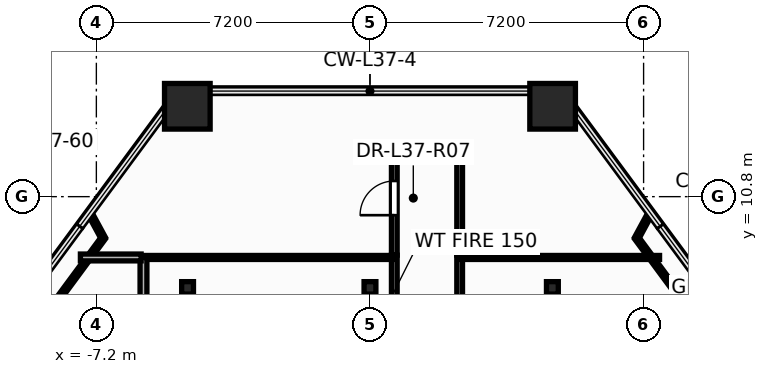
"""IFC4 building model, lengths in metres.
Left out: names, types, materials, properties, quantities, classifications, styles, units other than length and angle.
Written with IfcOpenShell. Run it as: python <this file> out.ifc"""

import sys

from ifc_helpers import new_model, si_unit, direction, frame, frame_2d, origin, origin_2d, place, context, subcontext, project, spatial, rectangle, hollow_rectangle, i_section, extrude, element, fill, save


model = new_model("IFC4")
c1 = context("Model", 3, precision=1e-05, world=origin(), true_north=direction((0.0, 1.0)))
c2 = subcontext(c1, "Body", "Model", "MODEL_VIEW")
j1 = project(units=[si_unit("LENGTHUNIT", "METRE"), si_unit("PLANEANGLEUNIT", "RADIAN")], contexts=[c1])
p1 = place(None, origin())
s1 = spatial("IfcSite", under=j1, at=p1, CompositionType="ELEMENT")
p2 = place(p1, origin())
s2 = spatial("IfcBuilding", under=s1, at=p2, CompositionType="ELEMENT")
p3 = place(p2, frame((0.0, 0.0, 143.7)))
s3 = spatial("IfcBuildingStorey", under=s2, at=p3, CompositionType="ELEMENT", Elevation=143.7)
for number, where, z_axis, x_axis in (
    (1, (4.806, 13.178, 0.0), (0.0, 0.0, 1.0), (1.0, 0.0, 0.0)),
    (2, (-4.806, 13.178, 0.0), (0.0, 0.0, 1.0), (1.0, 0.0, 0.0)),
):
    element("IfcColumn", number, at=place(p3, frame(where, z_axis=z_axis, x_axis=x_axis)), inside=s3, PredefinedType="COLUMN", context=c2, shape_type="SweptSolid", body=[
        extrude(hollow_rectangle(XDim=1.2, YDim=1.2, WallThickness=0.055, at=origin_2d()), origin(), (0.0, 0.0, 1.0), 3.6),
    ])
for number, where, z_axis, x_axis in (
    (3, (-4.8, 8.4, 0.0), (0.0, 0.0, 1.0), (1.0, 0.0, 0.0)),
    (4, (0.0, 8.4, 0.0), (0.0, 0.0, 1.0), (1.0, 0.0, 0.0)),
    (5, (4.8, 8.4, 0.0), (0.0, 0.0, 1.0), (1.0, 0.0, 0.0)),
):
    element("IfcColumn", number, at=place(p3, frame(where, z_axis=z_axis, x_axis=x_axis)), inside=s3, PredefinedType="COLUMN", context=c2, shape_type="SweptSolid", body=[
        extrude(i_section(OverallWidth=0.311, OverallDepth=0.327, WebThickness=0.016, FlangeThickness=0.025, at=origin_2d()), origin(), (0.0, 0.0, 1.0), 3.6),
    ])
p4 = place(p3, frame((0.64, -2.76, 0.0), z_axis=(0.0, 0.0, 1.0), x_axis=(0.0, 1.0, 0.0)))
e6 = element("IfcWall", 6, at=p4, inside=s3, PredefinedType="PARTITIONING", context=c2, shape_type="SweptSolid", body=[
    extrude(rectangle(XDim=12.02, YDim=0.15, at=frame_2d((6.01, 0.0))), origin(), (0.0, 0.0, 1.0), 2.325),
])
p5 = place(p4, frame((0.519, 0.0, 0.0)))
e7 = element("IfcOpeningElement", 7, at=p5, cuts=e6, PredefinedType="OPENING", context=c2, shape_type="SweptSolid", body=[
    extrude(rectangle(XDim=0.906, YDim=2.104, at=frame_2d((0.45, 1.052))), frame((0.0, 0.085, 0.0), z_axis=(0.0, -1.0, 0.0), x_axis=(1.0, 0.0, 0.0)), (0.0, 0.0, 1.0), 0.17),
])
p6 = place(p3, frame((2.36, -2.76, 0.0), z_axis=(0.0, 0.0, 1.0), x_axis=(0.0, 1.0, 0.0)))
e8 = element("IfcWall", 8, at=p6, inside=s3, PredefinedType="PARTITIONING", context=c2, shape_type="SweptSolid", body=[
    extrude(rectangle(XDim=12.02, YDim=0.15, at=frame_2d((6.01, 0.0))), origin(), (0.0, 0.0, 1.0), 2.325),
])
p7 = place(p6, frame((0.359, 0.0, 0.0)))
e9 = element("IfcOpeningElement", 9, at=p7, cuts=e8, PredefinedType="OPENING", context=c2, shape_type="SweptSolid", body=[
    extrude(rectangle(XDim=0.906, YDim=2.104, at=frame_2d((0.45, 1.052))), frame((0.0, 0.085, 0.0), z_axis=(0.0, -1.0, 0.0), x_axis=(1.0, 0.0, 0.0)), (0.0, 0.0, 1.0), 0.17),
])
p8 = place(p3, frame((-6.02, 9.2, 0.0), z_axis=(0.0, 0.0, 1.0), x_axis=(1.0, 0.0, 0.0)))
e10 = element("IfcWall", 10, at=p8, inside=s3, PredefinedType="PARTITIONING", context=c2, shape_type="SweptSolid", body=[
    extrude(rectangle(XDim=6.66, YDim=0.105, at=frame_2d((3.33, 0.0))), origin(), (0.0, 0.0, 1.0), 2.617),
])
p9 = place(p3, frame((-5.96, -2.76, 0.0), z_axis=(0.0, 0.0, 1.0), x_axis=(0.0, 1.0, 0.0)))
e11 = element("IfcWall", 11, at=p9, inside=s3, PredefinedType="PARTITIONING", context=c2, shape_type="SweptSolid", body=[
    extrude(rectangle(XDim=11.96, YDim=0.18, at=frame_2d((5.98, 0.0))), origin(), (0.0, 0.0, 1.0), 2.325),
])
p10 = place(p3, frame((2.36, 9.2, 0.0), z_axis=(0.0, 0.0, 1.0), x_axis=(1.0, 0.0, 0.0)))
e12 = element("IfcWall", 12, at=p10, inside=s3, PredefinedType="PARTITIONING", context=c2, shape_type="SweptSolid", body=[
    extrude(rectangle(XDim=5.26, YDim=0.105, at=frame_2d((2.63, 0.0))), origin(), (0.0, 0.0, 1.0), 2.617),
])
p11 = place(p3, frame((0.64, 9.262, 0.0), z_axis=(0.0, 0.0, 1.0), x_axis=(0.0, 1.0, 0.0)))
e13 = element("IfcWall", 13, at=p11, inside=s3, PredefinedType="PARTITIONING", context=c2, shape_type="SweptSolid", body=[
    extrude(rectangle(XDim=2.538, YDim=0.15, at=frame_2d((1.269, 0.0))), origin(), (0.0, 0.0, 1.0), 3.35),
])
p12 = place(p11, frame((1.05, 0.0, 0.0)))
e14 = element("IfcOpeningElement", 14, at=p12, cuts=e13, PredefinedType="OPENING", context=c2, shape_type="SweptSolid", body=[
    extrude(rectangle(XDim=0.906, YDim=2.104, at=frame_2d((0.45, 1.052))), frame((0.0, 0.085, 0.0), z_axis=(0.0, -1.0, 0.0), x_axis=(1.0, 0.0, 0.0)), (0.0, 0.0, 1.0), 0.17),
])
p13 = place(p3, frame((2.36, 9.262, 0.0), z_axis=(0.0, 0.0, 1.0), x_axis=(0.0, 1.0, 0.0)))
e15 = element("IfcWall", 15, at=p13, inside=s3, PredefinedType="PARTITIONING", context=c2, shape_type="SweptSolid", body=[
    extrude(rectangle(XDim=2.538, YDim=0.15, at=frame_2d((1.269, 0.0))), origin(), (0.0, 0.0, 1.0), 3.35),
])
for number, where, z_axis, x_axis in (
    (16, (-7.019, 9.71, 0.0), (0.0, 0.0, 1.0), (-0.594, -0.804, 0.0)),
    (17, (8.432, 7.798, 0.0), (0.0, 0.0, 1.0), (-0.594, 0.804, 0.0)),
):
    element("IfcWall", number, at=place(p3, frame(where, z_axis=z_axis, x_axis=x_axis)), inside=s3, PredefinedType="PARTITIONING", context=c2, shape_type="SweptSolid", body=[
        extrude(rectangle(XDim=2.378, YDim=0.12, at=frame_2d((1.189, 0.0))), origin(), (0.0, 0.0, 1.0), 3.35),
    ])
p14 = place(p3, frame((0.64, 11.8, 0.0), z_axis=(0.0, 0.0, 1.0), x_axis=(1.0, 0.0, 0.0)))
e18 = element("IfcWall", 18, at=p14, inside=s3, PredefinedType="PARTITIONING", context=c2, shape_type="SweptSolid", body=[
    extrude(rectangle(XDim=1.72, YDim=0.15, at=frame_2d((0.86, 0.0))), origin(), (0.0, 0.0, 1.0), 3.35),
])
p15 = place(p3, frame((-7.62, 9.2, 0.0), z_axis=(0.0, 0.0, 1.0), x_axis=(1.0, 0.0, 0.0)))
e19 = element("IfcWall", 19, at=p15, inside=s3, PredefinedType="PARTITIONING", context=c2, shape_type="SweptSolid", body=[
    extrude(rectangle(XDim=1.598, YDim=0.18, at=frame_2d((0.799, 0.0))), origin(), (0.0, 0.0, 1.0), 3.35),
])
for number, where, z_axis, x_axis in (
    (20, (-7.372, 10.361, 0.0), (0.0, 0.0, 1.0), (0.476, -0.879, 0.0)),
    (21, (7.019, 9.71, 0.0), (0.0, 0.0, 1.0), (0.476, 0.879, 0.0)),
):
    element("IfcWall", number, at=place(p3, frame(where, z_axis=z_axis, x_axis=x_axis)), inside=s3, PredefinedType="PARTITIONING", context=c2, shape_type="SweptSolid", body=[
        extrude(rectangle(XDim=0.74, YDim=0.12, at=frame_2d((0.37, 0.0))), origin(), (0.0, 0.0, 1.0), 2.792),
    ])
p16 = place(p12, origin())
e22 = element("IfcDoor", 22, at=p16, inside=s3, OperationType="SINGLE_SWING_LEFT", PredefinedType="DOOR", context=c2, shape_type="SweptSolid", body=[
    extrude(rectangle(XDim=0.9, YDim=2.1, at=frame_2d((0.45, 1.05))), frame((0.0, 0.025, 0.0), z_axis=(0.0, -1.0, 0.0), x_axis=(1.0, 0.0, 0.0)), (0.0, 0.0, 1.0), 0.05),
])
fill(e14, e22)
save(model, sys.argv[1])
